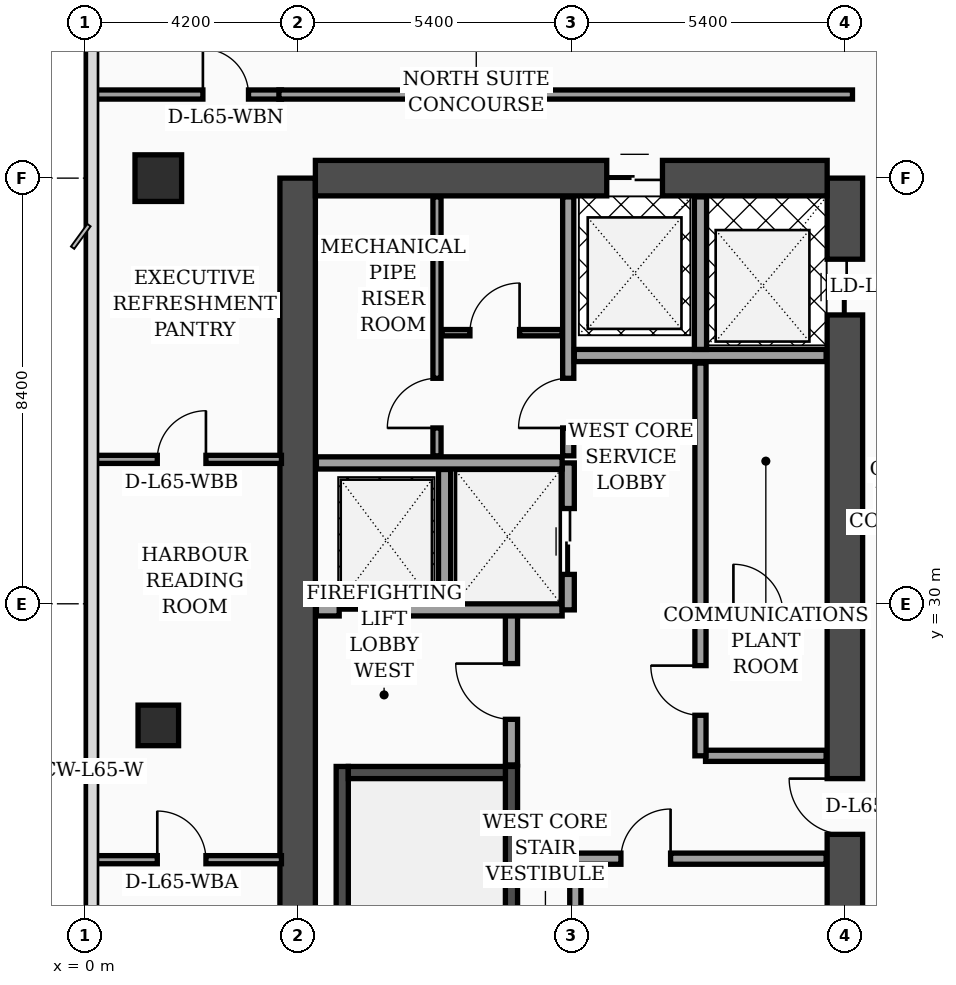
"""IFC4 building model, lengths in metres.
Left out: names, types, materials, properties, quantities, classifications, styles, units other than length and angle.
Written with IfcOpenShell. Run it as: python <this file> out.ifc"""

import sys

from ifc_helpers import new_model, si_unit, direction, frame, frame_2d, origin, origin_2d, place, context, subcontext, project, spatial, rectangle, extrude, element, fill, save


model = new_model("IFC4")
c1 = context("Model", 3, precision=1e-05, world=origin(), true_north=direction((0.0, 1.0)))
c2 = subcontext(c1, "Body", "Model", "MODEL_VIEW")
j1 = project(units=[si_unit("LENGTHUNIT", "METRE"), si_unit("PLANEANGLEUNIT", "RADIAN")], contexts=[c1])
p1 = place(None, origin())
s1 = spatial("IfcSite", under=j1, at=p1, CompositionType="ELEMENT")
p2 = place(p1, origin())
s2 = spatial("IfcBuilding", under=s1, at=p2, CompositionType="ELEMENT")
p3 = place(p2, frame((0.0, 0.0, 263.5)))
s3 = spatial("IfcBuildingStorey", under=s2, at=p3, CompositionType="ELEMENT", Elevation=263.5)
p4 = place(p3, frame((4.2, 16.8, 0.0), z_axis=(0.0, 0.0, 1.0), x_axis=(0.0, 1.0, 0.0)))
e1 = element("IfcWall", 1, at=p4, inside=s3, PredefinedType="SHEAR", context=c2, shape_type="SweptSolid", body=[
    extrude(rectangle(XDim=21.6, YDim=0.7, at=frame_2d((10.8, 0.0))), origin(), (0.0, 0.0, 1.0), 3.56),
])
p5 = place(p3, frame((15.0, 16.8, 0.0), z_axis=(0.0, 0.0, 1.0), x_axis=(0.0, 1.0, 0.0)))
e2 = element("IfcWall", 2, at=p5, inside=s3, PredefinedType="SHEAR", context=c2, shape_type="SweptSolid", body=[
    extrude(rectangle(XDim=21.6, YDim=0.7, at=frame_2d((10.8, 0.0))), origin(), (0.0, 0.0, 1.0), 3.56),
])
p6 = place(p5, frame((8.65, 0.0, 0.0)))
e3 = element("IfcOpeningElement", 3, at=p6, cuts=e2, PredefinedType="OPENING", context=c2, shape_type="SweptSolid", body=[
    extrude(rectangle(XDim=1.1, YDim=2.2, at=frame_2d((0.55, 1.1))), frame((0.0, 0.36, 0.0), z_axis=(0.0, -1.0, 0.0), x_axis=(1.0, 0.0, 0.0)), (0.0, 0.0, 1.0), 0.72),
])
p7 = place(p5, frame((18.9, 0.0, 0.0)))
e4 = element("IfcOpeningElement", 4, at=p7, cuts=e2, PredefinedType="OPENING", context=c2, shape_type="SweptSolid", body=[
    extrude(rectangle(XDim=1.1, YDim=2.2, at=frame_2d((0.55, 1.1))), frame((0.0, 0.36, 0.0), z_axis=(0.0, -1.0, 0.0), x_axis=(1.0, 0.0, 0.0)), (0.0, 0.0, 1.0), 0.72),
])
p8 = place(p3, frame((4.55, 38.4, 0.0), z_axis=(0.0, 0.0, 1.0), x_axis=(1.0, 0.0, 0.0)))
e5 = element("IfcWall", 5, at=p8, inside=s3, PredefinedType="SHEAR", context=c2, shape_type="SweptSolid", body=[
    extrude(rectangle(XDim=10.1, YDim=0.7, at=frame_2d((5.05, 0.0))), origin(), (0.0, 0.0, 1.0), 3.56),
])
p9 = place(p8, frame((5.75, 0.0, 0.0)))
e6 = element("IfcOpeningElement", 6, at=p9, cuts=e5, PredefinedType="OPENING", context=c2, shape_type="SweptSolid", body=[
    extrude(rectangle(XDim=1.1, YDim=2.2, at=frame_2d((0.55, 1.1))), frame((0.0, 0.36, 0.0), z_axis=(0.0, -1.0, 0.0), x_axis=(1.0, 0.0, 0.0)), (0.0, 0.0, 1.0), 0.72),
])
p10 = place(p3, frame((5.08, 17.15, 0.0), z_axis=(0.0, 0.0, 1.0), x_axis=(0.0, 1.0, 0.0)))
e7 = element("IfcWall", 7, at=p10, inside=s3, PredefinedType="SOLIDWALL", context=c2, shape_type="SweptSolid", body=[
    extrude(rectangle(XDim=9.64, YDim=0.24, at=frame_2d((4.82, 0.0))), origin(), (0.0, 0.0, 1.0), 3.56),
])
p11 = place(p3, frame((8.42, 17.15, 0.0), z_axis=(0.0, 0.0, 1.0), x_axis=(0.0, 1.0, 0.0)))
e8 = element("IfcWall", 8, at=p11, inside=s3, PredefinedType="SOLIDWALL", context=c2, shape_type="SweptSolid", body=[
    extrude(rectangle(XDim=9.64, YDim=0.24, at=frame_2d((4.82, 0.0))), origin(), (0.0, 0.0, 1.0), 3.56),
])
p12 = place(p11, frame((0.35, 0.0, 0.0)))
e9 = element("IfcOpeningElement", 9, at=p12, cuts=e8, PredefinedType="OPENING", context=c2, shape_type="SweptSolid", body=[
    extrude(rectangle(XDim=1.15, YDim=2.2, at=frame_2d((0.575, 1.1))), frame((0.0, 0.13, 0.0), z_axis=(0.0, -1.0, 0.0), x_axis=(1.0, 0.0, 0.0)), (0.0, 0.0, 1.0), 0.26),
])
p13 = place(p3, frame((5.2, 26.67, 0.0), z_axis=(0.0, 0.0, 1.0), x_axis=(1.0, 0.0, 0.0)))
e10 = element("IfcWall", 10, at=p13, inside=s3, PredefinedType="SOLIDWALL", context=c2, shape_type="SweptSolid", body=[
    extrude(rectangle(XDim=3.1, YDim=0.24, at=frame_2d((1.55, 0.0))), origin(), (0.0, 0.0, 1.0), 3.56),
])
p14 = place(p3, frame((1.45, 27.6, 0.0), z_axis=(0.0, 0.0, 1.0), x_axis=(1.0, 0.0, 0.0)))
e11 = element("IfcColumn", 11, at=p14, inside=s3, PredefinedType="COLUMN", context=c2, shape_type="SweptSolid", body=[
    extrude(rectangle(XDim=0.8, YDim=0.8, at=origin_2d()), origin(), (0.0, 0.0, 1.0), 3.56),
])
p15 = place(p3, frame((1.45, 38.4, 0.0), z_axis=(0.0, 0.0, 1.0), x_axis=(1.0, 0.0, 0.0)))
e12 = element("IfcColumn", 12, at=p15, inside=s3, PredefinedType="COLUMN", context=c2, shape_type="SweptSolid", body=[
    extrude(rectangle(XDim=0.92, YDim=0.92, at=origin_2d()), origin(), (0.0, 0.0, 1.0), 3.56),
])
p16 = place(p3, frame((8.42, 26.82, 0.0), z_axis=(0.0, 0.0, 1.0), x_axis=(0.0, 1.0, 0.0)))
e13 = element("IfcWall", 13, at=p16, inside=s3, PredefinedType="SOLIDWALL", context=c2, shape_type="SweptSolid", body=[
    extrude(rectangle(XDim=3.0, YDim=0.24, at=frame_2d((1.5, 0.0))), origin(), (0.0, 0.0, 1.0), 3.56),
])
p17 = place(p16, frame((0.9, 0.0, 0.0)))
e14 = element("IfcOpeningElement", 14, at=p17, cuts=e13, PredefinedType="OPENING", context=c2, shape_type="SweptSolid", body=[
    extrude(rectangle(XDim=1.1, YDim=2.2, at=frame_2d((0.55, 1.1))), frame((0.0, 0.13, 0.0), z_axis=(0.0, -1.0, 0.0), x_axis=(1.0, 0.0, 0.0)), (0.0, 0.0, 1.0), 0.26),
])
p18 = place(p3, frame((4.57, 29.88, 0.0), z_axis=(0.0, 0.0, 1.0), x_axis=(1.0, 0.0, 0.0)))
e15 = element("IfcWall", 15, at=p18, inside=s3, PredefinedType="SOLIDWALL", context=c2, shape_type="SweptSolid", body=[
    extrude(rectangle(XDim=4.85, YDim=0.24, at=frame_2d((2.425, 0.0))), origin(), (0.0, 0.0, 1.0), 3.56),
])
p19 = place(p18, frame((0.45, 0.0, 0.0)))
e16 = element("IfcOpeningElement", 16, at=p19, cuts=e15, PredefinedType="OPENING", context=c2, shape_type="SweptSolid", body=[
    extrude(rectangle(XDim=1.3, YDim=2.35, at=frame_2d((0.65, 1.175))), frame((0.0, 0.13, 0.0), z_axis=(0.0, -1.0, 0.0), x_axis=(1.0, 0.0, 0.0)), (0.0, 0.0, 1.0), 0.26),
])
p20 = place(p3, frame((7.1, 30.02, 0.0), z_axis=(0.0, 0.0, 1.0), x_axis=(0.0, 1.0, 0.0)))
e17 = element("IfcWall", 17, at=p20, inside=s3, PredefinedType="SOLIDWALL", context=c2, shape_type="SweptSolid", body=[
    extrude(rectangle(XDim=2.63, YDim=0.24, at=frame_2d((1.315, 0.0))), origin(), (0.0, 0.0, 1.0), 3.56),
])
p21 = place(p3, frame((9.54, 29.88, 0.0), z_axis=(0.0, 0.0, 1.0), x_axis=(0.0, 1.0, 0.0)))
e18 = element("IfcWall", 18, at=p21, inside=s3, PredefinedType="SOLIDWALL", context=c2, shape_type="SweptSolid", body=[
    extrude(rectangle(XDim=2.9, YDim=0.24, at=frame_2d((1.45, 0.0))), origin(), (0.0, 0.0, 1.0), 3.56),
])
p22 = place(p21, frame((0.7, 0.0, 0.0)))
e19 = element("IfcOpeningElement", 19, at=p22, cuts=e18, PredefinedType="OPENING", context=c2, shape_type="SweptSolid", body=[
    extrude(rectangle(XDim=1.3, YDim=2.35, at=frame_2d((0.65, 1.175))), frame((0.0, 0.13, 0.0), z_axis=(0.0, -1.0, 0.0), x_axis=(1.0, 0.0, 0.0)), (0.0, 0.0, 1.0), 0.26),
])
p23 = place(p3, frame((4.57, 32.78, 0.0), z_axis=(0.0, 0.0, 1.0), x_axis=(1.0, 0.0, 0.0)))
e20 = element("IfcWall", 20, at=p23, inside=s3, PredefinedType="SOLIDWALL", context=c2, shape_type="SweptSolid", body=[
    extrude(rectangle(XDim=4.85, YDim=0.24, at=frame_2d((2.425, 0.0))), origin(), (0.0, 0.0, 1.0), 3.19),
])
p24 = place(p3, frame((9.68, 17.17, 0.0), z_axis=(0.0, 0.0, 1.0), x_axis=(0.0, 1.0, 0.0)))
e21 = element("IfcWall", 21, at=p24, inside=s3, PredefinedType="SOLIDWALL", context=c2, shape_type="SweptSolid", body=[
    extrude(rectangle(XDim=7.83, YDim=0.22, at=frame_2d((3.915, 0.0))), origin(), (0.0, 0.0, 1.0), 3.56),
])
p25 = place(p3, frame((6.95, 32.92, 0.0), z_axis=(0.0, 0.0, 1.0), x_axis=(0.0, 1.0, 0.0)))
e22 = element("IfcWall", 22, at=p25, inside=s3, PredefinedType="PARTITIONING", context=c2, shape_type="SweptSolid", body=[
    extrude(rectangle(XDim=5.11, YDim=0.16, at=frame_2d((2.555, 0.0))), origin(), (0.0, 0.0, 1.0), 3.56),
])
p26 = place(p25, frame((0.55, 0.0, 0.0)))
e23 = element("IfcOpeningElement", 23, at=p26, cuts=e22, PredefinedType="OPENING", context=c2, shape_type="SweptSolid", body=[
    extrude(rectangle(XDim=0.98, YDim=2.15, at=frame_2d((0.49, 1.075))), frame((0.0, 0.09, 0.0), z_axis=(0.0, -1.0, 0.0), x_axis=(1.0, 0.0, 0.0)), (0.0, 0.0, 1.0), 0.18),
])
p27 = place(p3, frame((7.05, 35.35, 0.0), z_axis=(0.0, 0.0, 1.0), x_axis=(1.0, 0.0, 0.0)))
e24 = element("IfcWall", 24, at=p27, inside=s3, PredefinedType="PARTITIONING", context=c2, shape_type="SweptSolid", body=[
    extrude(rectangle(XDim=2.37, YDim=0.125, at=frame_2d((1.185, 0.0))), origin(), (0.0, 0.0, 1.0), 3.56),
])
p28 = place(p27, frame((0.55, 0.0, 0.0)))
e25 = element("IfcOpeningElement", 25, at=p28, cuts=e24, PredefinedType="OPENING", context=c2, shape_type="SweptSolid", body=[
    extrude(rectangle(XDim=0.98, YDim=2.15, at=frame_2d((0.49, 1.075))), frame((0.0, 0.073, 0.0), z_axis=(0.0, -1.0, 0.0), x_axis=(1.0, 0.0, 0.0)), (0.0, 0.0, 1.0), 0.145),
])
p29 = place(p3, frame((9.54, 32.92, 0.0), z_axis=(0.0, 0.0, 1.0), x_axis=(0.0, 1.0, 0.0)))
e26 = element("IfcWall", 26, at=p29, inside=s3, PredefinedType="SOLIDWALL", context=c2, shape_type="SweptSolid", body=[
    extrude(rectangle(XDim=5.11, YDim=0.22, at=frame_2d((2.555, 0.0))), origin(), (0.0, 0.0, 1.0), 3.56),
])
p30 = place(p29, frame((0.55, 0.0, 0.0)))
e27 = element("IfcOpeningElement", 27, at=p30, cuts=e26, PredefinedType="OPENING", context=c2, shape_type="SweptSolid", body=[
    extrude(rectangle(XDim=0.98, YDim=2.15, at=frame_2d((0.49, 1.075))), frame((0.0, 0.12, 0.0), z_axis=(0.0, -1.0, 0.0), x_axis=(1.0, 0.0, 0.0)), (0.0, 0.0, 1.0), 0.24),
])
p31 = place(p3, frame((9.68, 24.97, 0.0), z_axis=(0.0, 0.0, 1.0), x_axis=(1.0, 0.0, 0.0)))
e28 = element("IfcWall", 28, at=p31, inside=s3, PredefinedType="SOLIDWALL", context=c2, shape_type="SweptSolid", body=[
    extrude(rectangle(XDim=4.95, YDim=0.22, at=frame_2d((2.475, 0.0))), origin(), (0.0, 0.0, 1.0), 2.99),
])
p32 = place(p31, frame((0.9, 0.0, 0.0)))
e29 = element("IfcOpeningElement", 29, at=p32, cuts=e28, PredefinedType="OPENING", context=c2, shape_type="SweptSolid", body=[
    extrude(rectangle(XDim=0.98, YDim=2.15, at=frame_2d((0.49, 1.075))), frame((0.0, 0.12, 0.0), z_axis=(0.0, -1.0, 0.0), x_axis=(1.0, 0.0, 0.0)), (0.0, 0.0, 1.0), 0.24),
])
p33 = place(p3, frame((12.25, 27.0, 0.0), z_axis=(0.0, 0.0, 1.0), x_axis=(1.0, 0.0, 0.0)))
e30 = element("IfcWall", 30, at=p33, inside=s3, PredefinedType="SOLIDWALL", context=c2, shape_type="SweptSolid", body=[
    extrude(rectangle(XDim=2.38, YDim=0.22, at=frame_2d((1.19, 0.0))), origin(), (0.0, 0.0, 1.0), 3.56),
])
p34 = place(p3, frame((12.15, 27.0, 0.0), z_axis=(0.0, 0.0, 1.0), x_axis=(0.0, 1.0, 0.0)))
e31 = element("IfcWall", 31, at=p34, inside=s3, PredefinedType="SOLIDWALL", context=c2, shape_type="SweptSolid", body=[
    extrude(rectangle(XDim=7.75, YDim=0.22, at=frame_2d((3.875, 0.0))), origin(), (0.0, 0.0, 1.0), 3.56),
])
p35 = place(p34, frame((0.8, 0.0, 0.0)))
e32 = element("IfcOpeningElement", 32, at=p35, cuts=e31, PredefinedType="OPENING", context=c2, shape_type="SweptSolid", body=[
    extrude(rectangle(XDim=0.98, YDim=2.15, at=frame_2d((0.49, 1.075))), frame((0.0, 0.12, 0.0), z_axis=(0.0, -1.0, 0.0), x_axis=(1.0, 0.0, 0.0)), (0.0, 0.0, 1.0), 0.24),
])
p36 = place(p3, frame((12.25, 29.8, 0.0), z_axis=(0.0, 0.0, 1.0), x_axis=(1.0, 0.0, 0.0)))
e33 = element("IfcWall", 33, at=p36, inside=s3, PredefinedType="PARTITIONING", context=c2, shape_type="SweptSolid", body=[
    extrude(rectangle(XDim=2.38, YDim=0.16, at=frame_2d((1.19, 0.0))), origin(), (0.0, 0.0, 1.0), 3.56),
])
p37 = place(p36, frame((0.55, 0.0, 0.0)))
e34 = element("IfcOpeningElement", 34, at=p37, cuts=e33, PredefinedType="OPENING", context=c2, shape_type="SweptSolid", body=[
    extrude(rectangle(XDim=0.98, YDim=2.15, at=frame_2d((0.49, 1.075))), frame((0.0, 0.09, 0.0), z_axis=(0.0, -1.0, 0.0), x_axis=(1.0, 0.0, 0.0)), (0.0, 0.0, 1.0), 0.18),
])
p38 = place(p3, frame((9.66, 34.9, 0.0), z_axis=(0.0, 0.0, 1.0), x_axis=(1.0, 0.0, 0.0)))
e35 = element("IfcWall", 35, at=p38, inside=s3, PredefinedType="SOLIDWALL", context=c2, shape_type="SweptSolid", body=[
    extrude(rectangle(XDim=4.97, YDim=0.24, at=frame_2d((2.485, 0.0))), origin(), (0.0, 0.0, 1.0), 3.56),
])
p39 = place(p3, frame((12.15, 35.02, 0.0), z_axis=(0.0, 0.0, 1.0), x_axis=(0.0, 1.0, 0.0)))
e36 = element("IfcWall", 36, at=p39, inside=s3, PredefinedType="SOLIDWALL", context=c2, shape_type="SweptSolid", body=[
    extrude(rectangle(XDim=3.01, YDim=0.24, at=frame_2d((1.505, 0.0))), origin(), (0.0, 0.0, 1.0), 3.56),
])
p40 = place(p3, frame((0.08, 24.95, 0.0), z_axis=(0.0, 0.0, 1.0), x_axis=(1.0, 0.0, 0.0)))
e37 = element("IfcWall", 37, at=p40, inside=s3, PredefinedType="PARTITIONING", context=c2, shape_type="SweptSolid", body=[
    extrude(rectangle(XDim=3.8, YDim=0.16, at=frame_2d((1.9, 0.0))), origin(), (0.0, 0.0, 1.0), 3.09),
])
p41 = place(p40, frame((1.35, 0.0, 0.0)))
e38 = element("IfcOpeningElement", 38, at=p41, cuts=e37, PredefinedType="OPENING", context=c2, shape_type="SweptSolid", body=[
    extrude(rectangle(XDim=0.96, YDim=2.2, at=frame_2d((0.48, 1.1))), frame((0.0, 0.09, 0.0), z_axis=(0.0, -1.0, 0.0), x_axis=(1.0, 0.0, 0.0)), (0.0, 0.0, 1.0), 0.18),
])
p42 = place(p3, frame((0.08, 32.85, 0.0), z_axis=(0.0, 0.0, 1.0), x_axis=(1.0, 0.0, 0.0)))
e39 = element("IfcWall", 39, at=p42, inside=s3, PredefinedType="PARTITIONING", context=c2, shape_type="SweptSolid", body=[
    extrude(rectangle(XDim=3.8, YDim=0.16, at=frame_2d((1.9, 0.0))), origin(), (0.0, 0.0, 1.0), 3.09),
])
p43 = place(p42, frame((1.35, 0.0, 0.0)))
e40 = element("IfcOpeningElement", 40, at=p43, cuts=e39, PredefinedType="OPENING", context=c2, shape_type="SweptSolid", body=[
    extrude(rectangle(XDim=0.96, YDim=2.2, at=frame_2d((0.48, 1.1))), frame((0.0, 0.09, 0.0), z_axis=(0.0, -1.0, 0.0), x_axis=(1.0, 0.0, 0.0)), (0.0, 0.0, 1.0), 0.18),
])
p44 = place(p3, frame((0.08, 40.05, 0.0), z_axis=(0.0, 0.0, 1.0), x_axis=(1.0, 0.0, 0.0)))
e41 = element("IfcWall", 41, at=p44, inside=s3, PredefinedType="PARTITIONING", context=c2, shape_type="SweptSolid", body=[
    extrude(rectangle(XDim=3.8, YDim=0.18, at=frame_2d((1.9, 0.0))), origin(), (0.0, 0.0, 1.0), 2.99),
])
p45 = place(p44, frame((2.25, 0.0, 0.0)))
e42 = element("IfcOpeningElement", 42, at=p45, cuts=e41, PredefinedType="OPENING", context=c2, shape_type="SweptSolid", body=[
    extrude(rectangle(XDim=0.9, YDim=2.15, at=frame_2d((0.45, 1.075))), frame((0.0, 0.1, 0.0), z_axis=(0.0, -1.0, 0.0), x_axis=(1.0, 0.0, 0.0)), (0.0, 0.0, 1.0), 0.2),
])
p46 = place(p3, frame((3.83, 40.05, 0.0), z_axis=(0.0, 0.0, 1.0), x_axis=(1.0, 0.0, 0.0)))
e43 = element("IfcWall", 43, at=p46, inside=s3, PredefinedType="PARTITIONING", context=c2, shape_type="SweptSolid", body=[
    extrude(rectangle(XDim=11.32, YDim=0.18, at=frame_2d((5.66, 0.0))), origin(), (0.0, 0.0, 1.0), 2.99),
])
p47 = place(p17, origin())
e44 = element("IfcDoor", 44, at=p47, inside=s3, OperationType="SINGLE_SWING_RIGHT", PredefinedType="DOOR", context=c2, shape_type="SweptSolid", body=[
    extrude(rectangle(XDim=1.1, YDim=2.2, at=frame_2d((0.55, 1.1))), frame((0.0, 0.025, 0.0), z_axis=(0.0, -1.0, 0.0), x_axis=(1.0, 0.0, 0.0)), (0.0, 0.0, 1.0), 0.05),
])
fill(e14, e44)
p48 = place(p19, origin())
e45 = element("IfcDoor", 45, at=p48, inside=s3, OperationType="DOUBLE_DOOR_SLIDING", PredefinedType="DOOR", context=c2, shape_type="SweptSolid", body=[
    extrude(rectangle(XDim=1.3, YDim=2.35, at=frame_2d((0.65, 1.175))), frame((0.0, 0.025, 0.0), z_axis=(0.0, -1.0, 0.0), x_axis=(1.0, 0.0, 0.0)), (0.0, 0.0, 1.0), 0.05),
])
fill(e16, e45)
p49 = place(p22, origin())
e46 = element("IfcDoor", 46, at=p49, inside=s3, OperationType="DOUBLE_DOOR_SLIDING", PredefinedType="DOOR", context=c2, shape_type="SweptSolid", body=[
    extrude(rectangle(XDim=1.3, YDim=2.35, at=frame_2d((0.65, 1.175))), frame((0.0, 0.025, 0.0), z_axis=(0.0, -1.0, 0.0), x_axis=(1.0, 0.0, 0.0)), (0.0, 0.0, 1.0), 0.05),
])
fill(e19, e46)
p50 = place(p26, origin())
e47 = element("IfcDoor", 47, at=p50, inside=s3, OperationType="SINGLE_SWING_LEFT", PredefinedType="DOOR", context=c2, shape_type="SweptSolid", body=[
    extrude(rectangle(XDim=0.98, YDim=2.15, at=frame_2d((0.49, 1.075))), frame((0.0, 0.025, 0.0), z_axis=(0.0, -1.0, 0.0), x_axis=(1.0, 0.0, 0.0)), (0.0, 0.0, 1.0), 0.05),
])
fill(e23, e47)
p51 = place(p28, origin())
e48 = element("IfcDoor", 48, at=p51, inside=s3, OperationType="SINGLE_SWING_RIGHT", PredefinedType="DOOR", context=c2, shape_type="SweptSolid", body=[
    extrude(rectangle(XDim=0.98, YDim=2.15, at=frame_2d((0.49, 1.075))), frame((0.0, 0.025, 0.0), z_axis=(0.0, -1.0, 0.0), x_axis=(1.0, 0.0, 0.0)), (0.0, 0.0, 1.0), 0.05),
])
fill(e25, e48)
p52 = place(p30, origin())
e49 = element("IfcDoor", 49, at=p52, inside=s3, OperationType="SINGLE_SWING_LEFT", PredefinedType="DOOR", context=c2, shape_type="SweptSolid", body=[
    extrude(rectangle(XDim=0.98, YDim=2.15, at=frame_2d((0.49, 1.075))), frame((0.0, 0.025, 0.0), z_axis=(0.0, -1.0, 0.0), x_axis=(1.0, 0.0, 0.0)), (0.0, 0.0, 1.0), 0.05),
])
fill(e27, e49)
p53 = place(p32, origin())
e50 = element("IfcDoor", 50, at=p53, inside=s3, OperationType="SINGLE_SWING_RIGHT", PredefinedType="DOOR", context=c2, shape_type="SweptSolid", body=[
    extrude(rectangle(XDim=0.98, YDim=2.15, at=frame_2d((0.49, 1.075))), frame((0.0, 0.025, 0.0), z_axis=(0.0, -1.0, 0.0), x_axis=(1.0, 0.0, 0.0)), (0.0, 0.0, 1.0), 0.05),
])
fill(e29, e50)
p54 = place(p35, origin())
e51 = element("IfcDoor", 51, at=p54, inside=s3, OperationType="SINGLE_SWING_RIGHT", PredefinedType="DOOR", context=c2, shape_type="SweptSolid", body=[
    extrude(rectangle(XDim=0.98, YDim=2.15, at=frame_2d((0.49, 1.075))), frame((0.0, 0.025, 0.0), z_axis=(0.0, -1.0, 0.0), x_axis=(1.0, 0.0, 0.0)), (0.0, 0.0, 1.0), 0.05),
])
fill(e32, e51)
p55 = place(p37, origin())
e52 = element("IfcDoor", 52, at=p55, inside=s3, OperationType="SINGLE_SWING_LEFT", PredefinedType="DOOR", context=c2, shape_type="SweptSolid", body=[
    extrude(rectangle(XDim=0.98, YDim=2.15, at=frame_2d((0.49, 1.075))), frame((0.0, 0.025, 0.0), z_axis=(0.0, -1.0, 0.0), x_axis=(1.0, 0.0, 0.0)), (0.0, 0.0, 1.0), 0.05),
])
fill(e34, e52)
p56 = place(p41, origin())
e53 = element("IfcDoor", 53, at=p56, inside=s3, OperationType="SINGLE_SWING_LEFT", PredefinedType="DOOR", context=c2, shape_type="SweptSolid", body=[
    extrude(rectangle(XDim=0.96, YDim=2.2, at=frame_2d((0.48, 1.1))), frame((0.0, 0.025, 0.0), z_axis=(0.0, -1.0, 0.0), x_axis=(1.0, 0.0, 0.0)), (0.0, 0.0, 1.0), 0.05),
])
fill(e38, e53)
p57 = place(p43, origin())
e54 = element("IfcDoor", 54, at=p57, inside=s3, OperationType="SINGLE_SWING_RIGHT", PredefinedType="DOOR", context=c2, shape_type="SweptSolid", body=[
    extrude(rectangle(XDim=0.96, YDim=2.2, at=frame_2d((0.48, 1.1))), frame((0.0, 0.025, 0.0), z_axis=(0.0, -1.0, 0.0), x_axis=(1.0, 0.0, 0.0)), (0.0, 0.0, 1.0), 0.05),
])
fill(e40, e54)
p58 = place(p45, origin())
e55 = element("IfcDoor", 55, at=p58, inside=s3, OperationType="SINGLE_SWING_LEFT", PredefinedType="DOOR", context=c2, shape_type="SweptSolid", body=[
    extrude(rectangle(XDim=0.9, YDim=2.15, at=frame_2d((0.45, 1.075))), frame((0.0, 0.025, 0.0), z_axis=(0.0, -1.0, 0.0), x_axis=(1.0, 0.0, 0.0)), (0.0, 0.0, 1.0), 0.05),
])
fill(e42, e55)
p59 = place(p6, origin())
e56 = element("IfcDoor", 56, at=p59, inside=s3, OperationType="SINGLE_SWING_RIGHT", PredefinedType="DOOR", context=c2, shape_type="SweptSolid", body=[
    extrude(rectangle(XDim=1.1, YDim=2.2, at=frame_2d((0.55, 1.1))), frame((0.0, 0.025, 0.0), z_axis=(0.0, -1.0, 0.0), x_axis=(1.0, 0.0, 0.0)), (0.0, 0.0, 1.0), 0.05),
])
fill(e3, e56)
p60 = place(p7, origin())
e57 = element("IfcDoor", 57, at=p60, inside=s3, OperationType="DOUBLE_DOOR_SLIDING", PredefinedType="DOOR", context=c2, shape_type="SweptSolid", body=[
    extrude(rectangle(XDim=1.1, YDim=2.2, at=frame_2d((0.55, 1.1))), frame((0.0, 0.025, 0.0), z_axis=(0.0, -1.0, 0.0), x_axis=(1.0, 0.0, 0.0)), (0.0, 0.0, 1.0), 0.05),
])
fill(e4, e57)
p61 = place(p9, origin())
e58 = element("IfcDoor", 58, at=p61, inside=s3, OperationType="DOUBLE_DOOR_SLIDING", PredefinedType="DOOR", context=c2, shape_type="SweptSolid", body=[
    extrude(rectangle(XDim=1.1, YDim=2.2, at=frame_2d((0.55, 1.1))), frame((0.0, 0.025, 0.0), z_axis=(0.0, -1.0, 0.0), x_axis=(1.0, 0.0, 0.0)), (0.0, 0.0, 1.0), 0.05),
])
fill(e6, e58)
save(model, sys.argv[1])
